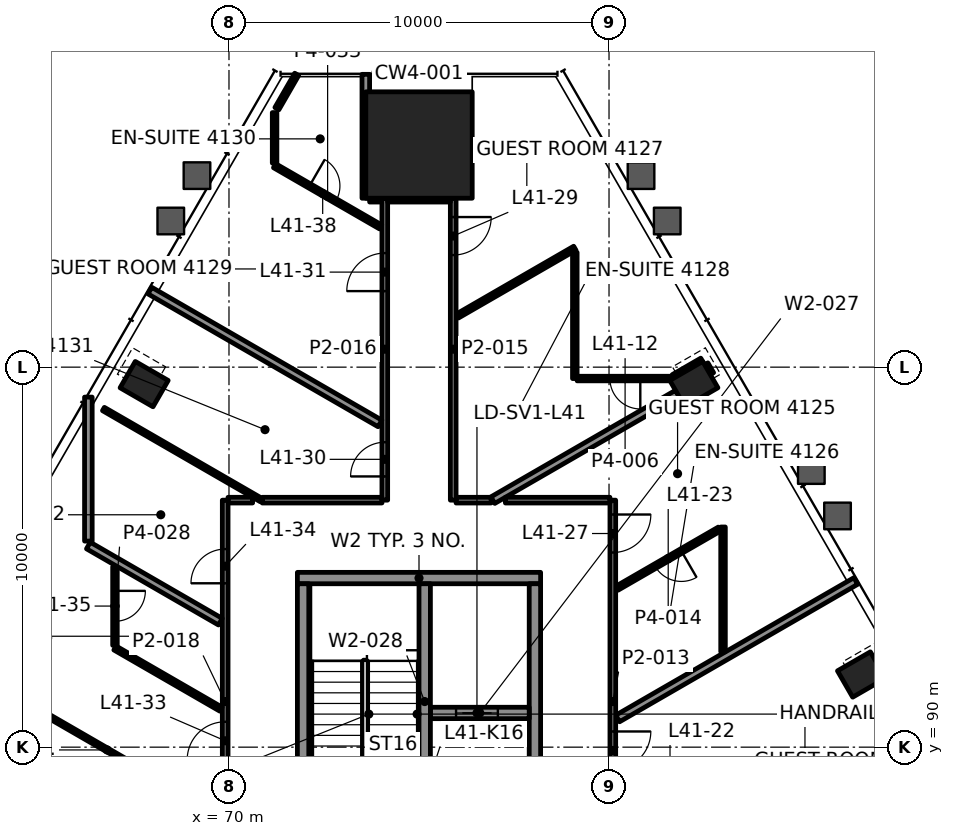
"""IFC4 building model, lengths in metres.
Left out: names, types, materials, properties, quantities, classifications, styles, units other than length and angle.
Written with IfcOpenShell. Run it as: python <this file> out.ifc"""

import sys

from ifc_helpers import new_model, si_unit, direction, frame, frame_2d, origin, origin_2d, place, context, subcontext, project, spatial, rectangle, hollow_rectangle, extrude, element, fill, save


model = new_model("IFC4")
c1 = context("Model", 3, precision=1e-05, world=origin(), true_north=direction((0.0, 1.0)))
c2 = subcontext(c1, "Body", "Model", "MODEL_VIEW")
j1 = project(units=[si_unit("LENGTHUNIT", "METRE"), si_unit("PLANEANGLEUNIT", "RADIAN")], contexts=[c1])
p1 = place(None, origin())
s1 = spatial("IfcSite", under=j1, at=p1, CompositionType="ELEMENT")
p2 = place(p1, origin())
s2 = spatial("IfcBuilding", under=s1, at=p2, CompositionType="ELEMENT")
p3 = place(p2, frame((0.0, 0.0, 179.2)))
s3 = spatial("IfcBuildingStorey", under=s2, at=p3, CompositionType="ELEMENT", Elevation=179.2)
p4 = place(p3, frame((75.0, 105.845, 0.0), z_axis=(0.0, 0.0, 1.0), x_axis=(-1.0, 0.0, 0.0)))
e1 = element("IfcColumn", 1, at=p4, inside=s3, PredefinedType="COLUMN", context=c2, shape_type="SweptSolid", body=[
    extrude(rectangle(XDim=2.8, YDim=2.8, at=origin_2d()), origin(), (0.0, 0.0, 1.0), 3.9),
])
for number, where, z_axis, x_axis in (
    (2, (86.645, 91.912, -0.0), (0.0, 0.0, 1.0), (-0.5, 0.866, 0.0)),
    (3, (82.232, 99.553, -0.0), (0.0, 0.0, 1.0), (-0.5, 0.866, 0.0)),
    (4, (67.768, 99.553, -0.0), (0.0, 0.0, 1.0), (-0.5, -0.866, 0.0)),
):
    element("IfcColumn", number, at=place(p3, frame(where, z_axis=z_axis, x_axis=x_axis)), inside=s3, PredefinedType="COLUMN", context=c2, shape_type="SweptSolid", body=[
        extrude(hollow_rectangle(XDim=0.8, YDim=1.0, WallThickness=0.05, at=origin_2d()), origin(), (0.0, 0.0, 1.0), 3.9),
    ])
p5 = place(p3, frame((71.8, 94.45, 0.0), z_axis=(0.0, 0.0, 1.0), x_axis=(1.0, 0.0, 0.0)))
e5 = element("IfcWall", 5, at=p5, inside=s3, PredefinedType="SHEAR", context=c2, shape_type="SweptSolid", body=[
    extrude(rectangle(XDim=6.4, YDim=0.3, at=frame_2d((3.2, 0.0))), origin(), (0.0, 0.0, 1.0), 3.7),
])
for number, where, z_axis, x_axis in (
    (6, (71.95, 88.1, 0.0), (0.0, 0.0, 1.0), (0.0, 1.0, 0.0)),
    (7, (78.05, 88.1, 0.0), (0.0, 0.0, 1.0), (0.0, 1.0, 0.0)),
):
    element("IfcWall", number, at=place(p3, frame(where, z_axis=z_axis, x_axis=x_axis)), inside=s3, PredefinedType="SHEAR", context=c2, shape_type="SweptSolid", body=[
        extrude(rectangle(XDim=6.2, YDim=0.3, at=frame_2d((3.1, 0.0))), origin(), (0.0, 0.0, 1.0), 3.7),
    ])
p6 = place(p3, frame((75.3, 90.9, 0.0), z_axis=(0.0, 0.0, 1.0), x_axis=(1.0, 0.0, 0.0)))
e8 = element("IfcWall", 8, at=p6, inside=s3, PredefinedType="SHEAR", context=c2, shape_type="SweptSolid", body=[
    extrude(rectangle(XDim=2.6, YDim=0.3, at=frame_2d((1.3, 0.0))), origin(), (0.0, 0.0, 1.0), 3.7),
])
p7 = place(p6, frame((0.675, 0.0, 0.0)))
e9 = element("IfcOpeningElement", 9, at=p7, cuts=e8, PredefinedType="OPENING", context=c2, shape_type="SweptSolid", body=[
    extrude(rectangle(XDim=1.1, YDim=2.1, at=frame_2d((0.55, 1.05))), frame((0.0, 0.16, 0.0), z_axis=(0.0, -1.0, 0.0), x_axis=(1.0, 0.0, 0.0)), (0.0, 0.0, 1.0), 0.32),
])
p8 = place(p3, frame((75.15, 88.1, 0.0), z_axis=(0.0, 0.0, 1.0), x_axis=(0.0, 1.0, 0.0)))
e10 = element("IfcWall", 10, at=p8, inside=s3, PredefinedType="SHEAR", context=c2, shape_type="SweptSolid", body=[
    extrude(rectangle(XDim=6.2, YDim=0.3, at=frame_2d((3.1, 0.0))), origin(), (0.0, 0.0, 1.0), 3.7),
])
p9 = place(p8, frame((0.185, 0.0, 0.0)))
e11 = element("IfcOpeningElement", 11, at=p9, cuts=e10, PredefinedType="OPENING", context=c2, shape_type="SweptSolid", body=[
    extrude(rectangle(XDim=1.0, YDim=2.1, at=frame_2d((0.5, 1.05))), frame((0.0, 0.16, 0.0), z_axis=(0.0, -1.0, 0.0), x_axis=(1.0, 0.0, 0.0)), (0.0, 0.0, 1.0), 0.32),
])
p10 = place(p3, frame((69.975, 96.5, 0.0), z_axis=(0.0, 0.0, 1.0), x_axis=(1.0, 0.0, 0.0)))
e12 = element("IfcWall", 12, at=p10, inside=s3, PredefinedType="PARTITIONING", context=c2, shape_type="SweptSolid", body=[
    extrude(rectangle(XDim=0.646, YDim=0.15, at=frame_2d((0.323, 0.0))), origin(), (0.0, 0.0, 1.0), 3.1),
])
p11 = place(p3, frame((75.975, 96.5, 0.0), z_axis=(0.0, 0.0, 1.0), x_axis=(1.0, 0.0, 0.0)))
e13 = element("IfcWall", 13, at=p11, inside=s3, PredefinedType="PARTITIONING", context=c2, shape_type="SweptSolid", body=[
    extrude(rectangle(XDim=0.925, YDim=0.15, at=frame_2d((0.463, 0.0))), origin(), (0.0, 0.0, 1.0), 3.1),
])
p12 = place(p3, frame((81.686, 99.7, 0.0), z_axis=(0.0, 0.0, 1.0), x_axis=(-1.0, 0.0, 0.0)))
e14 = element("IfcWall", 14, at=p12, inside=s3, PredefinedType="PARTITIONING", context=c2, shape_type="SweptSolid", body=[
    extrude(rectangle(XDim=2.526, YDim=0.12, at=frame_2d((1.263, 0.0))), origin(), (0.0, 0.0, 1.0), 3.1),
])
p13 = place(p12, frame((0.863, 0.0, 0.0)))
e15 = element("IfcOpeningElement", 15, at=p13, cuts=e14, PredefinedType="OPENING", context=c2, shape_type="SweptSolid", body=[
    extrude(rectangle(XDim=0.8, YDim=2.1, at=frame_2d((0.4, 1.05))), frame((0.0, 0.07, 0.0), z_axis=(0.0, -1.0, 0.0), x_axis=(1.0, 0.0, 0.0)), (0.0, 0.0, 1.0), 0.14),
])
p14 = place(p3, frame((73.7, 104.445, 0.0), z_axis=(0.0, 0.0, 1.0), x_axis=(1.0, 0.0, 0.0)))
e16 = element("IfcWall", 16, at=p14, inside=s3, PredefinedType="PARTITIONING", context=c2, shape_type="SweptSolid", body=[
    extrude(rectangle(XDim=0.324, YDim=0.2, at=frame_2d((0.162, 0.0))), origin(), (0.0, 0.0, 1.0), 3.1),
])
p15 = place(p3, frame((80.227, 90.754, 0.0), z_axis=(0.0, 0.0, 1.0), x_axis=(0.866019288795, 0.500010591322, 0.0)))
e17 = element("IfcWall", 17, at=p15, inside=s3, PredefinedType="PARTITIONING", context=c2, shape_type="SweptSolid", body=[
    extrude(rectangle(XDim=7.237, YDim=0.2, at=frame_2d((3.618, 0.0))), origin(), (0.0, 0.0, 1.0), 3.022),
])
p16 = place(p3, frame((82.905, 95.739, 0.0), z_axis=(0.0, 0.0, 1.0), x_axis=(-0.866028856698, -0.499994019331, 0.0)))
e18 = element("IfcWall", 18, at=p16, inside=s3, PredefinedType="PARTITIONING", context=c2, shape_type="SweptSolid", body=[
    extrude(rectangle(XDim=3.113, YDim=0.12, at=frame_2d((1.556, 0.0))), origin(), (0.0, 0.0, 1.0), 3.1),
])
p17 = place(p16, frame((1.156, 0.0, 0.0)))
e19 = element("IfcOpeningElement", 19, at=p17, cuts=e18, PredefinedType="OPENING", context=c2, shape_type="SweptSolid", body=[
    extrude(rectangle(XDim=0.8, YDim=2.1, at=frame_2d((0.4, 1.05))), frame((0.0, 0.07, 0.0), z_axis=(0.0, -1.0, 0.0), x_axis=(1.0, 0.0, 0.0)), (0.0, 0.0, 1.0), 0.14),
])
p18 = place(p3, frame((76.943, 96.5, 0.0), z_axis=(0.0, 0.0, 1.0), x_axis=(0.866015917575, 0.500016430238, 0.0)))
e20 = element("IfcWall", 20, at=p18, inside=s3, PredefinedType="PARTITIONING", context=c2, shape_type="SweptSolid", body=[
    extrude(rectangle(XDim=5.607, YDim=0.2, at=frame_2d((2.804, 0.0))), origin(), (0.0, 0.0, 1.0), 3.1),
])
p19 = place(p3, frame((81.712, 99.715, 0.0), z_axis=(0.0, 0.0, 1.0), x_axis=(0.866092063448, 0.499884524299, 0.0)))
e21 = element("IfcWall", 21, at=p19, inside=s3, PredefinedType="PARTITIONING", context=c2, shape_type="SweptSolid", body=[
    extrude(rectangle(XDim=0.869, YDim=0.2, at=frame_2d((0.435, 0.0))), origin(), (0.0, 0.0, 1.0), 3.1),
])
p20 = place(p3, frame((76.01, 101.346, 0.0), z_axis=(0.0, 0.0, 1.0), x_axis=(0.866045460162, 0.499965259726, 0.0)))
e22 = element("IfcWall", 22, at=p20, inside=s3, PredefinedType="PARTITIONING", context=c2, shape_type="SweptSolid", body=[
    extrude(rectangle(XDim=3.569, YDim=0.12, at=frame_2d((1.784, 0.0))), origin(), (0.0, 0.0, 1.0), 3.1),
])
p21 = place(p3, frame((71.26, 106.802, 0.0), z_axis=(0.0, 0.0, 1.0), x_axis=(0.500094169602, 0.865971028112, 0.0)))
e23 = element("IfcWall", 23, at=p21, inside=s3, PredefinedType="PARTITIONING", context=c2, shape_type="SweptSolid", body=[
    extrude(rectangle(XDim=1.042, YDim=0.12, at=frame_2d((0.521, 0.0))), origin(), (0.0, 0.0, 1.0), 3.1),
])
p22 = place(p3, frame((83.0, 92.51, 0.0), z_axis=(0.0, 0.0, 1.0), x_axis=(0.0, 1.0, 0.0)))
e24 = element("IfcWall", 24, at=p22, inside=s3, PredefinedType="PARTITIONING", context=c2, shape_type="SweptSolid", body=[
    extrude(rectangle(XDim=3.283, YDim=0.12, at=frame_2d((1.642, 0.0))), origin(), (0.0, 0.0, 1.0), 3.1),
])
p23 = place(p3, frame((80.1, 96.5, 0.0), z_axis=(0.0, 0.0, 1.0), x_axis=(0.0, -1.0, 0.0)))
e25 = element("IfcWall", 25, at=p23, inside=s3, PredefinedType="PARTITIONING", context=c2, shape_type="SweptSolid", body=[
    extrude(rectangle(XDim=10.6, YDim=0.15, at=frame_2d((5.3, 0.0))), origin(), (0.0, 0.0, 1.0), 3.022),
])
p24 = place(p23, frame((0.377, 0.0, 0.0)))
e26 = element("IfcOpeningElement", 26, at=p24, cuts=e25, PredefinedType="OPENING", context=c2, shape_type="SweptSolid", body=[
    extrude(rectangle(XDim=1.0, YDim=2.1, at=frame_2d((0.5, 1.05))), frame((0.0, 0.085, 0.0), z_axis=(0.0, -1.0, 0.0), x_axis=(1.0, 0.0, 0.0)), (0.0, 0.0, 1.0), 0.17),
])
p25 = place(p23, frame((6.087, 0.0, 0.0)))
e27 = element("IfcOpeningElement", 27, at=p25, cuts=e25, PredefinedType="OPENING", context=c2, shape_type="SweptSolid", body=[
    extrude(rectangle(XDim=1.0, YDim=2.1, at=frame_2d((0.5, 1.05))), frame((0.0, 0.085, 0.0), z_axis=(0.0, -1.0, 0.0), x_axis=(1.0, 0.0, 0.0)), (0.0, 0.0, 1.0), 0.17),
])
p26 = place(p3, frame((79.1, 99.7, 0.0), z_axis=(0.0, 0.0, 1.0), x_axis=(0.0, 1.0, 0.0)))
e28 = element("IfcWall", 28, at=p26, inside=s3, PredefinedType="PARTITIONING", context=c2, shape_type="SweptSolid", body=[
    extrude(rectangle(XDim=3.321, YDim=0.12, at=frame_2d((1.661, 0.0))), origin(), (0.0, 0.0, 1.0), 3.1),
])
p27 = place(p3, frame((75.9, 104.445, 0.0), z_axis=(0.0, 0.0, 1.0), x_axis=(0.0, -1.0, 0.0)))
e29 = element("IfcWall", 29, at=p27, inside=s3, PredefinedType="PARTITIONING", context=c2, shape_type="SweptSolid", body=[
    extrude(rectangle(XDim=7.945, YDim=0.15, at=frame_2d((3.972, 0.0))), origin(), (0.0, 0.0, 1.0), 3.1),
])
p28 = place(p27, frame((0.495, 0.0, 0.0)))
e30 = element("IfcOpeningElement", 30, at=p28, cuts=e29, PredefinedType="OPENING", context=c2, shape_type="SweptSolid", body=[
    extrude(rectangle(XDim=1.0, YDim=2.1, at=frame_2d((0.5, 1.05))), frame((0.0, 0.085, 0.0), z_axis=(0.0, -1.0, 0.0), x_axis=(1.0, 0.0, 0.0)), (0.0, 0.0, 1.0), 0.17),
])
p29 = place(p3, frame((74.1, 96.5, 0.0), z_axis=(0.0, 0.0, 1.0), x_axis=(0.0, 1.0, 0.0)))
e31 = element("IfcWall", 31, at=p29, inside=s3, PredefinedType="PARTITIONING", context=c2, shape_type="SweptSolid", body=[
    extrude(rectangle(XDim=7.945, YDim=0.15, at=frame_2d((3.973, 0.0))), origin(), (0.0, 0.0, 1.0), 3.1),
])
p30 = place(p29, frame((0.624, 0.0, 0.0)))
e32 = element("IfcOpeningElement", 32, at=p30, cuts=e31, PredefinedType="OPENING", context=c2, shape_type="SweptSolid", body=[
    extrude(rectangle(XDim=0.9, YDim=2.1, at=frame_2d((0.45, 1.05))), frame((0.0, 0.085, 0.0), z_axis=(0.0, -1.0, 0.0), x_axis=(1.0, 0.0, 0.0)), (0.0, 0.0, 1.0), 0.17),
])
p31 = place(p29, frame((5.501, 0.0, 0.0)))
e33 = element("IfcOpeningElement", 33, at=p31, cuts=e31, PredefinedType="OPENING", context=c2, shape_type="SweptSolid", body=[
    extrude(rectangle(XDim=1.0, YDim=2.1, at=frame_2d((0.5, 1.05))), frame((0.0, 0.085, 0.0), z_axis=(0.0, -1.0, 0.0), x_axis=(1.0, 0.0, 0.0)), (0.0, 0.0, 1.0), 0.17),
])
p32 = place(p3, frame((73.6, 104.446, 0.0), z_axis=(0.0, 0.0, 1.0), x_axis=(0.0, 1.0, 0.0)))
e34 = element("IfcWall", 34, at=p32, inside=s3, PredefinedType="PARTITIONING", context=c2, shape_type="SweptSolid", body=[
    extrude(rectangle(XDim=3.259, YDim=0.2, at=frame_2d((1.63, 0.0))), origin(), (0.0, 0.0, 1.0), 3.1),
])
p33 = place(p3, frame((71.2, 105.369, 0.0), z_axis=(0.0, 0.0, 1.0), x_axis=(0.0, 1.0, 0.0)))
e35 = element("IfcWall", 35, at=p33, inside=s3, PredefinedType="PARTITIONING", context=c2, shape_type="SweptSolid", body=[
    extrude(rectangle(XDim=1.329, YDim=0.12, at=frame_2d((0.665, 0.0))), origin(), (0.0, 0.0, 1.0), 3.1),
])
p34 = place(p3, frame((69.9, 85.9, 0.0), z_axis=(0.0, 0.0, 1.0), x_axis=(0.0, 1.0, 0.0)))
e36 = element("IfcWall", 36, at=p34, inside=s3, PredefinedType="PARTITIONING", context=c2, shape_type="SweptSolid", body=[
    extrude(rectangle(XDim=10.6, YDim=0.15, at=frame_2d((5.3, 0.0))), origin(), (0.0, 0.0, 1.0), 3.022),
])
p35 = place(p34, frame((3.767, 0.0, 0.0)))
e37 = element("IfcOpeningElement", 37, at=p35, cuts=e36, PredefinedType="OPENING", context=c2, shape_type="SweptSolid", body=[
    extrude(rectangle(XDim=1.0, YDim=2.1, at=frame_2d((0.5, 1.05))), frame((0.0, 0.085, 0.0), z_axis=(0.0, -1.0, 0.0), x_axis=(1.0, 0.0, 0.0)), (0.0, 0.0, 1.0), 0.17),
])
p36 = place(p34, frame((8.412, 0.0, 0.0)))
e38 = element("IfcOpeningElement", 38, at=p36, cuts=e36, PredefinedType="OPENING", context=c2, shape_type="SweptSolid", body=[
    extrude(rectangle(XDim=0.9, YDim=2.1, at=frame_2d((0.45, 1.05))), frame((0.0, 0.085, 0.0), z_axis=(0.0, -1.0, 0.0), x_axis=(1.0, 0.0, 0.0)), (0.0, 0.0, 1.0), 0.17),
])
p37 = place(p3, frame((67.0, 94.747, 0.0), z_axis=(0.0, 0.0, 1.0), x_axis=(0.0, -1.0, 0.0)))
e39 = element("IfcWall", 39, at=p37, inside=s3, PredefinedType="PARTITIONING", context=c2, shape_type="SweptSolid", body=[
    extrude(rectangle(XDim=2.068, YDim=0.12, at=frame_2d((1.034, 0.0))), origin(), (0.0, 0.0, 1.0), 3.1),
])
p38 = place(p37, frame((0.634, 0.0, 0.0)))
e40 = element("IfcOpeningElement", 40, at=p38, cuts=e39, PredefinedType="OPENING", context=c2, shape_type="SweptSolid", body=[
    extrude(rectangle(XDim=0.8, YDim=2.1, at=frame_2d((0.4, 1.05))), frame((0.0, 0.07, 0.0), z_axis=(0.0, -1.0, 0.0), x_axis=(1.0, 0.0, 0.0)), (0.0, 0.0, 1.0), 0.14),
])
p39 = place(p3, frame((66.3, 95.423, 0.0), z_axis=(0.0, 0.0, 1.0), x_axis=(0.0, 1.0, 0.0)))
e41 = element("IfcWall", 41, at=p39, inside=s3, PredefinedType="PARTITIONING", context=c2, shape_type="SweptSolid", body=[
    extrude(rectangle(XDim=3.789, YDim=0.2, at=frame_2d((1.895, 0.0))), origin(), (0.0, 0.0, 1.0), 3.022),
])
p40 = place(p3, frame((82.665, 99.803, 0.0), z_axis=(0.0, 0.0, 1.0), x_axis=(-0.499910707084, 0.866076950936, 0.0)))
e42 = element("IfcWall", 42, at=p40, inside=s3, PredefinedType="PARTITIONING", context=c2, shape_type="SweptSolid", body=[
    extrude(rectangle(XDim=0.299, YDim=0.2, at=frame_2d((0.15, 0.0))), origin(), (0.0, 0.0, 1.0), 3.1),
])
p41 = place(p3, frame((71.2, 105.301, 0.0), z_axis=(0.0, 0.0, 1.0), x_axis=(0.866010186656, -0.500026355914, 0.0)))
e43 = element("IfcWall", 43, at=p41, inside=s3, PredefinedType="PARTITIONING", context=c2, shape_type="SweptSolid", body=[
    extrude(rectangle(XDim=3.222, YDim=0.12, at=frame_2d((1.611, 0.0))), origin(), (0.0, 0.0, 1.0), 3.1),
])
p42 = place(p41, frame((1.061, 0.0, 0.0)))
e44 = element("IfcOpeningElement", 44, at=p42, cuts=e43, PredefinedType="OPENING", context=c2, shape_type="SweptSolid", body=[
    extrude(rectangle(XDim=0.8, YDim=2.1, at=frame_2d((0.4, 1.05))), frame((0.0, 0.07, 0.0), z_axis=(0.0, -1.0, 0.0), x_axis=(1.0, 0.0, 0.0)), (0.0, 0.0, 1.0), 0.14),
])
p43 = place(p3, frame((73.973, 98.518, 0.0), z_axis=(0.0, 0.0, 1.0), x_axis=(-0.866016957496, 0.500014629116, 0.0)))
e45 = element("IfcWall", 45, at=p43, inside=s3, PredefinedType="PARTITIONING", context=c2, shape_type="SweptSolid", body=[
    extrude(rectangle(XDim=6.992, YDim=0.2, at=frame_2d((3.496, 0.0))), origin(), (0.0, 0.0, 1.0), 3.1),
])
p44 = place(p3, frame((70.851, 96.5, 0.0), z_axis=(0.0, 0.0, 1.0), x_axis=(-0.866016914842, 0.500014702992, 0.0)))
e46 = element("IfcWall", 46, at=p44, inside=s3, PredefinedType="PARTITIONING", context=c2, shape_type="SweptSolid", body=[
    extrude(rectangle(XDim=4.797, YDim=0.1, at=frame_2d((2.398, 0.0))), origin(), (0.0, 0.0, 1.0), 3.022),
])
p45 = place(p3, frame((69.773, 93.302, 0.0), z_axis=(0.0, 0.0, 1.0), x_axis=(-0.866046692957, 0.499963124258, 0.0)))
e47 = element("IfcWall", 47, at=p45, inside=s3, PredefinedType="PARTITIONING", context=c2, shape_type="SweptSolid", body=[
    extrude(rectangle(XDim=4.01, YDim=0.2, at=frame_2d((2.005, 0.0))), origin(), (0.0, 0.0, 1.0), 3.1),
])
p46 = place(p3, frame((69.79, 90.998, 0.0), z_axis=(0.0, 0.0, 1.0), x_axis=(-0.866029130051, 0.499993545862, 0.0)))
e48 = element("IfcWall", 48, at=p46, inside=s3, PredefinedType="PARTITIONING", context=c2, shape_type="SweptSolid", body=[
    extrude(rectangle(XDim=3.222, YDim=0.12, at=frame_2d((1.611, 0.0))), origin(), (0.0, 0.0, 1.0), 3.1),
])
p47 = place(p3, frame((69.799, 88.192, 0.0), z_axis=(0.0, 0.0, 1.0), x_axis=(-0.866013353477, 0.500020871164, 0.0)))
e49 = element("IfcWall", 49, at=p47, inside=s3, PredefinedType="PARTITIONING", context=c2, shape_type="SweptSolid", body=[
    extrude(rectangle(XDim=6.94, YDim=0.1, at=frame_2d((3.47, 0.0))), origin(), (0.0, 0.0, 1.0), 3.022),
])
p48 = place(p3, frame((70.875, 96.5, 0.0), z_axis=(0.0, 0.0, 1.0), x_axis=(1.0, 0.0, 0.0)))
e50 = element("IfcWall", 50, at=p48, inside=s3, PredefinedType="PARTITIONING", context=c2, shape_type="SweptSolid", body=[
    extrude(rectangle(XDim=3.149, YDim=0.15, at=frame_2d((1.575, 0.0))), origin(), (0.0, 0.0, 1.0), 3.1),
])
p49 = place(p3, frame((77.273, 96.5, 0.0), z_axis=(0.0, 0.0, 1.0), x_axis=(1.0, 0.0, 0.0)))
e51 = element("IfcWall", 51, at=p49, inside=s3, PredefinedType="PARTITIONING", context=c2, shape_type="SweptSolid", body=[
    extrude(rectangle(XDim=2.752, YDim=0.15, at=frame_2d((1.376, 0.0))), origin(), (0.0, 0.0, 1.0), 3.1),
])
p50 = place(p3, frame((74.175, 104.445, 0.0), z_axis=(0.0, 0.0, 1.0), x_axis=(1.0, 0.0, 0.0)))
e52 = element("IfcWall", 52, at=p50, inside=s3, PredefinedType="PARTITIONING", context=c2, shape_type="SweptSolid", body=[
    extrude(rectangle(XDim=1.649, YDim=0.2, at=frame_2d((0.825, 0.0))), origin(), (0.0, 0.0, 1.0), 3.097),
])
p51 = place(p13, origin())
e53 = element("IfcDoor", 53, at=p51, inside=s3, OperationType="SINGLE_SWING_RIGHT", PredefinedType="DOOR", context=c2, shape_type="SweptSolid", body=[
    extrude(rectangle(XDim=0.8, YDim=2.1, at=frame_2d((0.4, 1.05))), frame((0.0, 0.025, 0.0), z_axis=(0.0, -1.0, 0.0), x_axis=(1.0, 0.0, 0.0)), (0.0, 0.0, 1.0), 0.05),
])
fill(e15, e53)
p52 = place(p17, origin())
e54 = element("IfcDoor", 54, at=p52, inside=s3, OperationType="SINGLE_SWING_RIGHT", PredefinedType="DOOR", context=c2, shape_type="SweptSolid", body=[
    extrude(rectangle(XDim=0.8, YDim=2.1, at=frame_2d((0.4, 1.05))), frame((0.0, 0.025, 0.0), z_axis=(0.0, -1.0, 0.0), x_axis=(1.0, 0.0, 0.0)), (0.0, 0.0, 1.0), 0.05),
])
fill(e19, e54)
p53 = place(p24, origin())
e55 = element("IfcDoor", 55, at=p53, inside=s3, OperationType="SINGLE_SWING_LEFT", PredefinedType="DOOR", context=c2, shape_type="SweptSolid", body=[
    extrude(rectangle(XDim=1.0, YDim=2.1, at=frame_2d((0.5, 1.05))), frame((0.0, 0.025, 0.0), z_axis=(0.0, -1.0, 0.0), x_axis=(1.0, 0.0, 0.0)), (0.0, 0.0, 1.0), 0.05),
])
fill(e26, e55)
p54 = place(p25, origin())
e56 = element("IfcDoor", 56, at=p54, inside=s3, OperationType="SINGLE_SWING_LEFT", PredefinedType="DOOR", context=c2, shape_type="SweptSolid", body=[
    extrude(rectangle(XDim=1.0, YDim=2.1, at=frame_2d((0.5, 1.05))), frame((0.0, 0.025, 0.0), z_axis=(0.0, -1.0, 0.0), x_axis=(1.0, 0.0, 0.0)), (0.0, 0.0, 1.0), 0.05),
])
fill(e27, e56)
p55 = place(p28, origin())
e57 = element("IfcDoor", 57, at=p55, inside=s3, OperationType="SINGLE_SWING_LEFT", PredefinedType="DOOR", context=c2, shape_type="SweptSolid", body=[
    extrude(rectangle(XDim=1.0, YDim=2.1, at=frame_2d((0.5, 1.05))), frame((0.0, 0.025, 0.0), z_axis=(0.0, -1.0, 0.0), x_axis=(1.0, 0.0, 0.0)), (0.0, 0.0, 1.0), 0.05),
])
fill(e30, e57)
p56 = place(p30, origin())
e58 = element("IfcDoor", 58, at=p56, inside=s3, OperationType="SINGLE_SWING_RIGHT", PredefinedType="DOOR", context=c2, shape_type="SweptSolid", body=[
    extrude(rectangle(XDim=0.9, YDim=2.1, at=frame_2d((0.45, 1.05))), frame((0.0, 0.025, 0.0), z_axis=(0.0, -1.0, 0.0), x_axis=(1.0, 0.0, 0.0)), (0.0, 0.0, 1.0), 0.05),
])
fill(e32, e58)
p57 = place(p31, origin())
e59 = element("IfcDoor", 59, at=p57, inside=s3, OperationType="SINGLE_SWING_RIGHT", PredefinedType="DOOR", context=c2, shape_type="SweptSolid", body=[
    extrude(rectangle(XDim=1.0, YDim=2.1, at=frame_2d((0.5, 1.05))), frame((0.0, 0.025, 0.0), z_axis=(0.0, -1.0, 0.0), x_axis=(1.0, 0.0, 0.0)), (0.0, 0.0, 1.0), 0.05),
])
fill(e33, e59)
p58 = place(p35, origin())
e60 = element("IfcDoor", 60, at=p58, inside=s3, OperationType="SINGLE_SWING_RIGHT", PredefinedType="DOOR", context=c2, shape_type="SweptSolid", body=[
    extrude(rectangle(XDim=1.0, YDim=2.1, at=frame_2d((0.5, 1.05))), frame((0.0, 0.025, 0.0), z_axis=(0.0, -1.0, 0.0), x_axis=(1.0, 0.0, 0.0)), (0.0, 0.0, 1.0), 0.05),
])
fill(e37, e60)
p59 = place(p36, origin())
e61 = element("IfcDoor", 61, at=p59, inside=s3, OperationType="SINGLE_SWING_LEFT", PredefinedType="DOOR", context=c2, shape_type="SweptSolid", body=[
    extrude(rectangle(XDim=0.9, YDim=2.1, at=frame_2d((0.45, 1.05))), frame((0.0, 0.025, 0.0), z_axis=(0.0, -1.0, 0.0), x_axis=(1.0, 0.0, 0.0)), (0.0, 0.0, 1.0), 0.05),
])
fill(e38, e61)
p60 = place(p38, origin())
e62 = element("IfcDoor", 62, at=p60, inside=s3, OperationType="SINGLE_SWING_RIGHT", PredefinedType="DOOR", context=c2, shape_type="SweptSolid", body=[
    extrude(rectangle(XDim=0.8, YDim=2.1, at=frame_2d((0.4, 1.05))), frame((0.0, 0.025, 0.0), z_axis=(0.0, -1.0, 0.0), x_axis=(1.0, 0.0, 0.0)), (0.0, 0.0, 1.0), 0.05),
])
fill(e40, e62)
p61 = place(p42, origin())
e63 = element("IfcDoor", 63, at=p61, inside=s3, OperationType="SINGLE_SWING_RIGHT", PredefinedType="DOOR", context=c2, shape_type="SweptSolid", body=[
    extrude(rectangle(XDim=0.8, YDim=2.1, at=frame_2d((0.4, 1.05))), frame((0.0, 0.025, 0.0), z_axis=(0.0, -1.0, 0.0), x_axis=(1.0, 0.0, 0.0)), (0.0, 0.0, 1.0), 0.05),
])
fill(e44, e63)
p62 = place(p7, origin())
e64 = element("IfcDoor", 64, at=p62, inside=s3, OperationType="DOUBLE_DOOR_SLIDING", PredefinedType="DOOR", context=c2, shape_type="SweptSolid", body=[
    extrude(rectangle(XDim=1.1, YDim=2.1, at=frame_2d((0.55, 1.05))), frame((0.0, 0.025, 0.0), z_axis=(0.0, -1.0, 0.0), x_axis=(1.0, 0.0, 0.0)), (0.0, 0.0, 1.0), 0.05),
])
fill(e9, e64)
save(model, sys.argv[1])
